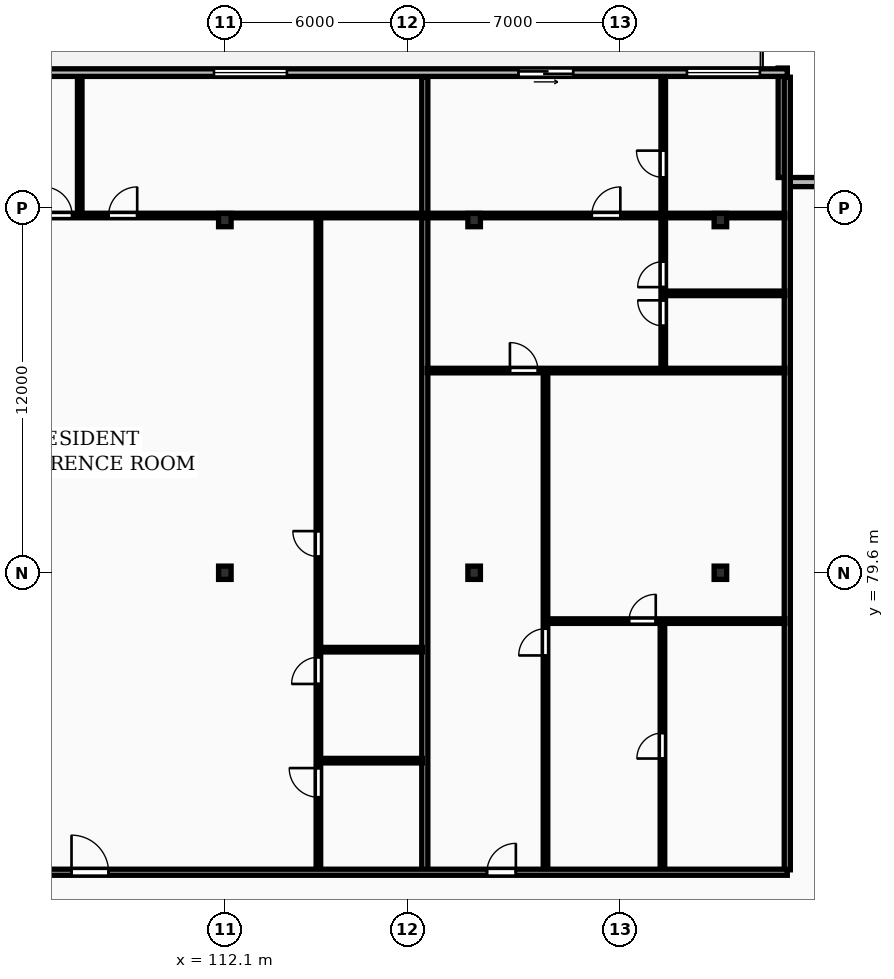
"""IFC4 building model, lengths in metres.
Left out: names, types, materials, properties, quantities, classifications, styles, units other than length and angle.
Written with IfcOpenShell. Run it as: python <this file> out.ifc"""

import sys

from ifc_helpers import new_model, si_unit, direction, frame, frame_2d, origin, origin_2d, place, context, subcontext, project, spatial, rectangle, i_section, extrude, element, fill, save


model = new_model("IFC4")
c1 = context("Model", 3, precision=1e-05, world=origin(), true_north=direction((0.0, 1.0)))
c2 = subcontext(c1, "Body", "Model", "MODEL_VIEW")
j1 = project(units=[si_unit("LENGTHUNIT", "METRE"), si_unit("PLANEANGLEUNIT", "RADIAN")], contexts=[c1])
p1 = place(None, origin())
s1 = spatial("IfcSite", under=j1, at=p1, CompositionType="ELEMENT")
p2 = place(p1, origin())
s2 = spatial("IfcBuilding", under=s1, at=p2, CompositionType="ELEMENT")
p3 = place(p2, frame((0.0, 0.0, 150.1)))
s3 = spatial("IfcBuildingStorey", under=s2, at=p3, CompositionType="ELEMENT", Elevation=150.1)
for number, where, z_axis, x_axis in (
    (1, (112.1, 79.6, 0.0), (0.0, 0.0, 1.0), (1.0, 0.0, 0.0)),
    (2, (112.1, 91.2, 0.0), (0.0, 0.0, 1.0), (1.0, 0.0, 0.0)),
    (3, (120.3, 79.6, 0.0), (0.0, 0.0, 1.0), (1.0, 0.0, 0.0)),
    (4, (120.3, 91.2, 0.0), (0.0, 0.0, 1.0), (1.0, 0.0, 0.0)),
    (5, (128.4, 79.6, 0.0), (0.0, 0.0, 1.0), (1.0, 0.0, 0.0)),
    (6, (128.4, 91.2, 0.0), (0.0, 0.0, 1.0), (1.0, 0.0, 0.0)),
):
    element("IfcColumn", number, at=place(p3, frame(where, z_axis=z_axis, x_axis=x_axis)), inside=s3, PredefinedType="COLUMN", context=c2, shape_type="SweptSolid", body=[
        extrude(i_section(OverallWidth=0.412, OverallDepth=0.437, WebThickness=0.036, FlangeThickness=0.052, FilletRadius=0.015, at=origin_2d()), origin(), (0.0, 0.0, 1.0), 3.6),
    ])
for number, where, z_axis, x_axis in (
    (7, (134.2, 92.45, 0.0), (0.0, 0.0, 1.0), (-1.0, 0.0, 0.0)),
    (8, (130.45, 92.6, 0.0), (0.0, 0.0, 1.0), (0.0, 1.0, 0.0)),
):
    element("IfcWall", number, at=place(p3, frame(where, z_axis=z_axis, x_axis=x_axis)), inside=s3, PredefinedType="STANDARD", context=c2, shape_type="SweptSolid", body=[
        extrude(rectangle(XDim=3.6, YDim=0.3, at=frame_2d((1.8, 0.0))), origin(), (0.0, 0.0, 1.0), 3.31),
    ])
p4 = place(p3, frame((130.6, 96.05, 0.0), z_axis=(0.0, 0.0, 1.0), x_axis=(-1.0, 0.0, 0.0)))
e9 = element("IfcWall", 9, at=p4, inside=s3, PredefinedType="STANDARD", context=c2, shape_type="SweptSolid", body=[
    extrude(rectangle(XDim=73.0, YDim=0.25, at=frame_2d((36.5, 0.0))), origin(), (0.0, 0.0, 1.0), 3.31),
])
p5 = place(p4, frame((67.311, 0.0, 0.0)))
e10 = element("IfcOpeningElement", 10, at=p5, cuts=e9, PredefinedType="OPENING", context=c2, shape_type="SweptSolid", body=[
    extrude(rectangle(XDim=1.8, YDim=2.2, at=frame_2d((0.9, 1.1))), frame((0.0, 0.135, 0.0), z_axis=(0.0, -1.0, 0.0), x_axis=(1.0, 0.0, 0.0)), (0.0, 0.0, 1.0), 0.27),
])
p6 = place(p4, frame((56.252, 0.0, 0.85)))
e11 = element("IfcOpeningElement", 11, at=p6, cuts=e9, PredefinedType="OPENING", context=c2, shape_type="SweptSolid", body=[
    extrude(rectangle(XDim=2.4, YDim=1.9, at=frame_2d((1.2, 0.95))), frame((0.0, 0.135, 0.0), z_axis=(0.0, -1.0, 0.0), x_axis=(1.0, 0.0, 0.0)), (0.0, 0.0, 1.0), 0.27),
])
p7 = place(p4, frame((46.071, 0.0, 0.0)))
e12 = element("IfcOpeningElement", 12, at=p7, cuts=e9, PredefinedType="OPENING", context=c2, shape_type="SweptSolid", body=[
    extrude(rectangle(XDim=1.8, YDim=2.2, at=frame_2d((0.9, 1.1))), frame((0.0, 0.135, 0.0), z_axis=(0.0, -1.0, 0.0), x_axis=(1.0, 0.0, 0.0)), (0.0, 0.0, 1.0), 0.27),
])
p8 = place(p4, frame((36.161, 0.0, 0.85)))
e13 = element("IfcOpeningElement", 13, at=p8, cuts=e9, PredefinedType="OPENING", context=c2, shape_type="SweptSolid", body=[
    extrude(rectangle(XDim=2.4, YDim=1.9, at=frame_2d((1.2, 0.95))), frame((0.0, 0.135, 0.0), z_axis=(0.0, -1.0, 0.0), x_axis=(1.0, 0.0, 0.0)), (0.0, 0.0, 1.0), 0.27),
])
p9 = place(p4, frame((26.569, 0.0, 0.0)))
e14 = element("IfcOpeningElement", 14, at=p9, cuts=e9, PredefinedType="OPENING", context=c2, shape_type="SweptSolid", body=[
    extrude(rectangle(XDim=1.8, YDim=2.2, at=frame_2d((0.9, 1.1))), frame((0.0, 0.135, 0.0), z_axis=(0.0, -1.0, 0.0), x_axis=(1.0, 0.0, 0.0)), (0.0, 0.0, 1.0), 0.27),
])
p10 = place(p4, frame((16.458, 0.0, 0.85)))
e15 = element("IfcOpeningElement", 15, at=p10, cuts=e9, PredefinedType="OPENING", context=c2, shape_type="SweptSolid", body=[
    extrude(rectangle(XDim=2.4, YDim=1.9, at=frame_2d((1.2, 0.95))), frame((0.0, 0.135, 0.0), z_axis=(0.0, -1.0, 0.0), x_axis=(1.0, 0.0, 0.0)), (0.0, 0.0, 1.0), 0.27),
])
p11 = place(p4, frame((7.042, 0.0, 0.0)))
e16 = element("IfcOpeningElement", 16, at=p11, cuts=e9, PredefinedType="OPENING", context=c2, shape_type="SweptSolid", body=[
    extrude(rectangle(XDim=1.8, YDim=2.2, at=frame_2d((0.9, 1.1))), frame((0.0, 0.135, 0.0), z_axis=(0.0, -1.0, 0.0), x_axis=(1.0, 0.0, 0.0)), (0.0, 0.0, 1.0), 0.27),
])
p12 = place(p4, frame((0.9, 0.0, 0.85)))
e17 = element("IfcOpeningElement", 17, at=p12, cuts=e9, PredefinedType="OPENING", context=c2, shape_type="SweptSolid", body=[
    extrude(rectangle(XDim=2.4, YDim=1.9, at=frame_2d((1.2, 0.95))), frame((0.0, 0.135, 0.0), z_axis=(0.0, -1.0, 0.0), x_axis=(1.0, 0.0, 0.0)), (0.0, 0.0, 1.0), 0.27),
])
for number, where, z_axis, x_axis in (
    (18, (130.6, 69.83, 0.0), (0.0, 0.0, 1.0), (0.0, 1.0, 0.0)),
    (19, (118.677, 69.83, 0.0), (0.0, 0.0, 1.0), (0.0, 1.0, 0.0)),
):
    element("IfcWall", number, at=place(p3, frame(where, z_axis=z_axis, x_axis=x_axis)), inside=s3, PredefinedType="PARTITIONING", context=c2, shape_type="SweptSolid", body=[
        extrude(rectangle(XDim=26.07, YDim=0.2, at=frame_2d((13.035, 0.0))), origin(), (0.0, 0.0, 1.0), 3.31),
    ])
for number, where, z_axis, x_axis in (
    (20, (115.237, 73.42, 0.0), (0.0, 0.0, 1.0), (1.0, 0.0, 0.0)),
    (21, (115.237, 77.07, 0.0), (0.0, 0.0, 1.0), (1.0, 0.0, 0.0)),
):
    element("IfcWall", number, at=place(p3, frame(where, z_axis=z_axis, x_axis=x_axis)), inside=s3, PredefinedType="PARTITIONING", context=c2, shape_type="SweptSolid", body=[
        extrude(rectangle(XDim=3.36, YDim=0.15, at=frame_2d((1.68, 0.0))), origin(), (0.0, 0.0, 1.0), 3.31),
    ])
p13 = place(p3, frame((115.177, 69.81, 0.0), z_axis=(0.0, 0.0, 1.0), x_axis=(0.0, 1.0, 0.0)))
e22 = element("IfcWall", 22, at=p13, inside=s3, PredefinedType="PARTITIONING", context=c2, shape_type="SweptSolid", body=[
    extrude(rectangle(XDim=21.48, YDim=0.15, at=frame_2d((10.74, 0.0))), origin(), (0.0, 0.0, 1.0), 3.31),
])
p14 = place(p13, frame((2.406, 0.0, 0.0)))
e23 = element("IfcOpeningElement", 23, at=p14, cuts=e22, PredefinedType="OPENING", context=c2, shape_type="SweptSolid", body=[
    extrude(rectangle(XDim=0.96, YDim=2.1, at=frame_2d((0.48, 1.05))), frame((0.0, 0.085, 0.0), z_axis=(0.0, -1.0, 0.0), x_axis=(1.0, 0.0, 0.0)), (0.0, 0.0, 1.0), 0.17),
])
p15 = place(p13, frame((6.133, 0.0, 0.0)))
e24 = element("IfcOpeningElement", 24, at=p15, cuts=e22, PredefinedType="OPENING", context=c2, shape_type="SweptSolid", body=[
    extrude(rectangle(XDim=0.88, YDim=2.06, at=frame_2d((0.44, 1.03))), frame((0.0, 0.085, 0.0), z_axis=(0.0, -1.0, 0.0), x_axis=(1.0, 0.0, 0.0)), (0.0, 0.0, 1.0), 0.17),
])
p16 = place(p13, frame((10.32, 0.0, 0.0)))
e25 = element("IfcOpeningElement", 25, at=p16, cuts=e22, PredefinedType="OPENING", context=c2, shape_type="SweptSolid", body=[
    extrude(rectangle(XDim=0.84, YDim=2.04, at=frame_2d((0.42, 1.02))), frame((0.0, 0.085, 0.0), z_axis=(0.0, -1.0, 0.0), x_axis=(1.0, 0.0, 0.0)), (0.0, 0.0, 1.0), 0.17),
])
p17 = place(p3, frame((107.327, 91.43, 0.0), z_axis=(0.0, 0.0, 1.0), x_axis=(0.0, 1.0, 0.0)))
e26 = element("IfcWall", 26, at=p17, inside=s3, PredefinedType="PARTITIONING", context=c2, shape_type="SweptSolid", body=[
    extrude(rectangle(XDim=4.47, YDim=0.15, at=frame_2d((2.235, 0.0))), origin(), (0.0, 0.0, 1.0), 3.31),
])
p18 = place(p3, frame((98.896, 91.35, 0.0), z_axis=(0.0, 0.0, 1.0), x_axis=(1.0, 0.0, 0.0)))
e27 = element("IfcWall", 27, at=p18, inside=s3, PredefinedType="PARTITIONING", context=c2, shape_type="SweptSolid", body=[
    extrude(rectangle(XDim=19.701, YDim=0.15, at=frame_2d((9.851, 0.0))), origin(), (0.0, 0.0, 1.0), 3.003),
])
p19 = place(p18, frame((7.24, 0.0, 0.0)))
e28 = element("IfcOpeningElement", 28, at=p19, cuts=e27, PredefinedType="OPENING", context=c2, shape_type="SweptSolid", body=[
    extrude(rectangle(XDim=0.94, YDim=2.1, at=frame_2d((0.47, 1.05))), frame((0.0, 0.085, 0.0), z_axis=(0.0, -1.0, 0.0), x_axis=(1.0, 0.0, 0.0)), (0.0, 0.0, 1.0), 0.17),
])
p20 = place(p18, frame((9.381, 0.0, 0.0)))
e29 = element("IfcOpeningElement", 29, at=p20, cuts=e27, PredefinedType="OPENING", context=c2, shape_type="SweptSolid", body=[
    extrude(rectangle(XDim=0.94, YDim=2.1, at=frame_2d((0.47, 1.05))), frame((0.0, 0.085, 0.0), z_axis=(0.0, -1.0, 0.0), x_axis=(1.0, 0.0, 0.0)), (0.0, 0.0, 1.0), 0.17),
])
p21 = place(p3, frame((126.494, 69.81, 0.0), z_axis=(0.0, 0.0, 1.0), x_axis=(0.0, 1.0, 0.0)))
e30 = element("IfcWall", 30, at=p21, inside=s3, PredefinedType="PARTITIONING", context=c2, shape_type="SweptSolid", body=[
    extrude(rectangle(XDim=8.2, YDim=0.15, at=frame_2d((4.1, 0.0))), origin(), (0.0, 0.0, 1.0), 3.31),
])
p22 = place(p21, frame((3.68, 0.0, 0.0)))
e31 = element("IfcOpeningElement", 31, at=p22, cuts=e30, PredefinedType="OPENING", context=c2, shape_type="SweptSolid", body=[
    extrude(rectangle(XDim=0.84, YDim=2.04, at=frame_2d((0.42, 1.02))), frame((0.0, 0.085, 0.0), z_axis=(0.0, -1.0, 0.0), x_axis=(1.0, 0.0, 0.0)), (0.0, 0.0, 1.0), 0.17),
])
p23 = place(p3, frame((122.707, 78.01, 0.0), z_axis=(0.0, 0.0, 1.0), x_axis=(1.0, 0.0, 0.0)))
e32 = element("IfcWall", 32, at=p23, inside=s3, PredefinedType="PARTITIONING", context=c2, shape_type="SweptSolid", body=[
    extrude(rectangle(XDim=7.813, YDim=0.15, at=frame_2d((3.906, 0.0))), origin(), (0.0, 0.0, 1.0), 3.31),
])
p24 = place(p23, frame((2.686, 0.0, 0.0)))
e33 = element("IfcOpeningElement", 33, at=p24, cuts=e32, PredefinedType="OPENING", context=c2, shape_type="SweptSolid", body=[
    extrude(rectangle(XDim=0.88, YDim=2.06, at=frame_2d((0.44, 1.03))), frame((0.0, 0.085, 0.0), z_axis=(0.0, -1.0, 0.0), x_axis=(1.0, 0.0, 0.0)), (0.0, 0.0, 1.0), 0.17),
])
p25 = place(p3, frame((122.647, 69.81, 0.0), z_axis=(0.0, 0.0, 1.0), x_axis=(0.0, 1.0, 0.0)))
e34 = element("IfcWall", 34, at=p25, inside=s3, PredefinedType="PARTITIONING", context=c2, shape_type="SweptSolid", body=[
    extrude(rectangle(XDim=16.4, YDim=0.15, at=frame_2d((8.2, 0.0))), origin(), (0.0, 0.0, 1.0), 3.31),
])
p26 = place(p25, frame((7.07, 0.0, 0.0)))
e35 = element("IfcOpeningElement", 35, at=p26, cuts=e34, PredefinedType="OPENING", context=c2, shape_type="SweptSolid", body=[
    extrude(rectangle(XDim=0.88, YDim=2.06, at=frame_2d((0.44, 1.03))), frame((0.0, 0.085, 0.0), z_axis=(0.0, -1.0, 0.0), x_axis=(1.0, 0.0, 0.0)), (0.0, 0.0, 1.0), 0.17),
])
p27 = place(p3, frame((126.58, 88.79, 0.0), z_axis=(0.0, 0.0, 1.0), x_axis=(1.0, 0.0, 0.0)))
e36 = element("IfcWall", 36, at=p27, inside=s3, PredefinedType="PARTITIONING", context=c2, shape_type="SweptSolid", body=[
    extrude(rectangle(XDim=3.94, YDim=0.15, at=frame_2d((1.97, 0.0))), origin(), (0.0, 0.0, 1.0), 3.31),
])
p28 = place(p3, frame((126.52, 86.29, 0.0), z_axis=(0.0, 0.0, 1.0), x_axis=(0.0, 1.0, 0.0)))
e37 = element("IfcWall", 37, at=p28, inside=s3, PredefinedType="PARTITIONING", context=c2, shape_type="SweptSolid", body=[
    extrude(rectangle(XDim=9.61, YDim=0.15, at=frame_2d((4.805, 0.0))), origin(), (0.0, 0.0, 1.0), 3.31),
])
p29 = place(p28, frame((1.43, 0.0, 0.0)))
e38 = element("IfcOpeningElement", 38, at=p29, cuts=e37, PredefinedType="OPENING", context=c2, shape_type="SweptSolid", body=[
    extrude(rectangle(XDim=0.84, YDim=2.04, at=frame_2d((0.42, 1.02))), frame((0.0, 0.085, 0.0), z_axis=(0.0, -1.0, 0.0), x_axis=(1.0, 0.0, 0.0)), (0.0, 0.0, 1.0), 0.17),
])
p30 = place(p28, frame((2.705, 0.0, 0.0)))
e39 = element("IfcOpeningElement", 39, at=p30, cuts=e37, PredefinedType="OPENING", context=c2, shape_type="SweptSolid", body=[
    extrude(rectangle(XDim=0.84, YDim=2.04, at=frame_2d((0.42, 1.02))), frame((0.0, 0.085, 0.0), z_axis=(0.0, -1.0, 0.0), x_axis=(1.0, 0.0, 0.0)), (0.0, 0.0, 1.0), 0.17),
])
p31 = place(p28, frame((6.314, 0.0, 0.0)))
e40 = element("IfcOpeningElement", 40, at=p31, cuts=e37, PredefinedType="OPENING", context=c2, shape_type="SweptSolid", body=[
    extrude(rectangle(XDim=0.88, YDim=2.06, at=frame_2d((0.44, 1.03))), frame((0.0, 0.085, 0.0), z_axis=(0.0, -1.0, 0.0), x_axis=(1.0, 0.0, 0.0)), (0.0, 0.0, 1.0), 0.17),
])
p32 = place(p3, frame((118.757, 86.25, 0.0), z_axis=(0.0, 0.0, 1.0), x_axis=(1.0, 0.0, 0.0)))
e41 = element("IfcWall", 41, at=p32, inside=s3, PredefinedType="PARTITIONING", context=c2, shape_type="SweptSolid", body=[
    extrude(rectangle(XDim=11.763, YDim=0.15, at=frame_2d((5.881, 0.0))), origin(), (0.0, 0.0, 1.0), 3.31),
])
p33 = place(p32, frame((2.72, 0.0, 0.0)))
e42 = element("IfcOpeningElement", 42, at=p33, cuts=e41, PredefinedType="OPENING", context=c2, shape_type="SweptSolid", body=[
    extrude(rectangle(XDim=0.92, YDim=2.08, at=frame_2d((0.46, 1.04))), frame((0.0, 0.085, 0.0), z_axis=(0.0, -1.0, 0.0), x_axis=(1.0, 0.0, 0.0)), (0.0, 0.0, 1.0), 0.17),
])
p34 = place(p3, frame((118.757, 91.35, 0.0), z_axis=(0.0, 0.0, 1.0), x_axis=(1.0, 0.0, 0.0)))
e43 = element("IfcWall", 43, at=p34, inside=s3, PredefinedType="PARTITIONING", context=c2, shape_type="SweptSolid", body=[
    extrude(rectangle(XDim=11.763, YDim=0.15, at=frame_2d((5.881, 0.0))), origin(), (0.0, 0.0, 1.0), 3.003),
])
p35 = place(p34, frame((5.411, 0.0, 0.0)))
e44 = element("IfcOpeningElement", 44, at=p35, cuts=e43, PredefinedType="OPENING", context=c2, shape_type="SweptSolid", body=[
    extrude(rectangle(XDim=0.94, YDim=2.1, at=frame_2d((0.47, 1.05))), frame((0.0, 0.085, 0.0), z_axis=(0.0, -1.0, 0.0), x_axis=(1.0, 0.0, 0.0)), (0.0, 0.0, 1.0), 0.17),
])
p36 = place(p3, frame((57.6, 69.75, 0.0), z_axis=(0.0, 0.0, 1.0), x_axis=(1.0, 0.0, 0.0)))
e45 = element("IfcWall", 45, at=p36, inside=s3, PredefinedType="PARTITIONING", context=c2, shape_type="SweptSolid", body=[
    extrude(rectangle(XDim=73.0, YDim=0.2, at=frame_2d((36.5, 0.0))), origin(), (0.0, 0.0, 1.0), 3.31),
])
p37 = place(p36, frame((9.189, 0.0, 0.0)))
e46 = element("IfcOpeningElement", 46, at=p37, cuts=e45, PredefinedType="OPENING", context=c2, shape_type="SweptSolid", body=[
    extrude(rectangle(XDim=1.22, YDim=2.18, at=frame_2d((0.61, 1.09))), frame((0.0, 0.11, 0.0), z_axis=(0.0, -1.0, 0.0), x_axis=(1.0, 0.0, 0.0)), (0.0, 0.0, 1.0), 0.22),
])
p38 = place(p36, frame((29.912, 0.0, 0.0)))
e47 = element("IfcOpeningElement", 47, at=p38, cuts=e45, PredefinedType="OPENING", context=c2, shape_type="SweptSolid", body=[
    extrude(rectangle(XDim=1.22, YDim=2.18, at=frame_2d((0.61, 1.09))), frame((0.0, 0.11, 0.0), z_axis=(0.0, -1.0, 0.0), x_axis=(1.0, 0.0, 0.0)), (0.0, 0.0, 1.0), 0.22),
])
p39 = place(p36, frame((49.457, 0.0, 0.0)))
e48 = element("IfcOpeningElement", 48, at=p39, cuts=e45, PredefinedType="OPENING", context=c2, shape_type="SweptSolid", body=[
    extrude(rectangle(XDim=1.22, YDim=2.18, at=frame_2d((0.61, 1.09))), frame((0.0, 0.11, 0.0), z_axis=(0.0, -1.0, 0.0), x_axis=(1.0, 0.0, 0.0)), (0.0, 0.0, 1.0), 0.22),
])
p40 = place(p36, frame((63.122, 0.0, 0.0)))
e49 = element("IfcOpeningElement", 49, at=p40, cuts=e45, PredefinedType="OPENING", context=c2, shape_type="SweptSolid", body=[
    extrude(rectangle(XDim=0.95, YDim=2.15, at=frame_2d((0.475, 1.075))), frame((0.0, 0.11, 0.0), z_axis=(0.0, -1.0, 0.0), x_axis=(1.0, 0.0, 0.0)), (0.0, 0.0, 1.0), 0.22),
])
p41 = place(p10, origin())
e50 = element("IfcWindow", 50, at=p41, inside=s3, PartitioningType="DOUBLE_PANEL_VERTICAL", PredefinedType="WINDOW", context=c2, shape_type="SweptSolid", body=[
    extrude(rectangle(XDim=2.4, YDim=1.9, at=frame_2d((1.2, 0.95))), frame((0.0, 0.03, 0.0), z_axis=(0.0, -1.0, 0.0), x_axis=(1.0, 0.0, 0.0)), (0.0, 0.0, 1.0), 0.06),
])
fill(e15, e50)
p42 = place(p11, origin())
e51 = element("IfcDoor", 51, at=p42, inside=s3, OperationType="SLIDING_TO_LEFT", PredefinedType="DOOR", context=c2, shape_type="SweptSolid", body=[
    extrude(rectangle(XDim=1.8, YDim=2.2, at=frame_2d((0.9, 1.1))), frame((0.0, 0.025, 0.0), z_axis=(0.0, -1.0, 0.0), x_axis=(1.0, 0.0, 0.0)), (0.0, 0.0, 1.0), 0.05),
])
fill(e16, e51)
p43 = place(p12, origin())
e52 = element("IfcWindow", 52, at=p43, inside=s3, PartitioningType="DOUBLE_PANEL_VERTICAL", PredefinedType="WINDOW", context=c2, shape_type="SweptSolid", body=[
    extrude(rectangle(XDim=2.4, YDim=1.9, at=frame_2d((1.2, 0.95))), frame((0.0, 0.03, 0.0), z_axis=(0.0, -1.0, 0.0), x_axis=(1.0, 0.0, 0.0)), (0.0, 0.0, 1.0), 0.06),
])
fill(e17, e52)
p44 = place(p14, origin())
e53 = element("IfcDoor", 53, at=p44, inside=s3, OperationType="SINGLE_SWING_RIGHT", PredefinedType="DOOR", context=c2, shape_type="SweptSolid", body=[
    extrude(rectangle(XDim=0.96, YDim=2.1, at=frame_2d((0.48, 1.05))), frame((0.0, 0.025, 0.0), z_axis=(0.0, -1.0, 0.0), x_axis=(1.0, 0.0, 0.0)), (0.0, 0.0, 1.0), 0.05),
])
fill(e23, e53)
p45 = place(p15, origin())
e54 = element("IfcDoor", 54, at=p45, inside=s3, OperationType="SINGLE_SWING_LEFT", PredefinedType="DOOR", context=c2, shape_type="SweptSolid", body=[
    extrude(rectangle(XDim=0.88, YDim=2.06, at=frame_2d((0.44, 1.03))), frame((0.0, 0.025, 0.0), z_axis=(0.0, -1.0, 0.0), x_axis=(1.0, 0.0, 0.0)), (0.0, 0.0, 1.0), 0.05),
])
fill(e24, e54)
p46 = place(p16, origin())
e55 = element("IfcDoor", 55, at=p46, inside=s3, OperationType="SINGLE_SWING_RIGHT", PredefinedType="DOOR", context=c2, shape_type="SweptSolid", body=[
    extrude(rectangle(XDim=0.84, YDim=2.04, at=frame_2d((0.42, 1.02))), frame((0.0, 0.025, 0.0), z_axis=(0.0, -1.0, 0.0), x_axis=(1.0, 0.0, 0.0)), (0.0, 0.0, 1.0), 0.05),
])
fill(e25, e55)
p47 = place(p19, origin())
e56 = element("IfcDoor", 56, at=p47, inside=s3, OperationType="SINGLE_SWING_LEFT", PredefinedType="DOOR", context=c2, shape_type="SweptSolid", body=[
    extrude(rectangle(XDim=0.94, YDim=2.1, at=frame_2d((0.47, 1.05))), frame((0.0, 0.025, 0.0), z_axis=(0.0, -1.0, 0.0), x_axis=(1.0, 0.0, 0.0)), (0.0, 0.0, 1.0), 0.05),
])
fill(e28, e56)
p48 = place(p20, origin())
e57 = element("IfcDoor", 57, at=p48, inside=s3, OperationType="SINGLE_SWING_RIGHT", PredefinedType="DOOR", context=c2, shape_type="SweptSolid", body=[
    extrude(rectangle(XDim=0.94, YDim=2.1, at=frame_2d((0.47, 1.05))), frame((0.0, 0.025, 0.0), z_axis=(0.0, -1.0, 0.0), x_axis=(1.0, 0.0, 0.0)), (0.0, 0.0, 1.0), 0.05),
])
fill(e29, e57)
p49 = place(p22, origin())
e58 = element("IfcDoor", 58, at=p49, inside=s3, OperationType="SINGLE_SWING_LEFT", PredefinedType="DOOR", context=c2, shape_type="SweptSolid", body=[
    extrude(rectangle(XDim=0.84, YDim=2.04, at=frame_2d((0.42, 1.02))), frame((0.0, 0.025, 0.0), z_axis=(0.0, -1.0, 0.0), x_axis=(1.0, 0.0, 0.0)), (0.0, 0.0, 1.0), 0.05),
])
fill(e31, e58)
p50 = place(p24, origin())
e59 = element("IfcDoor", 59, at=p50, inside=s3, OperationType="SINGLE_SWING_RIGHT", PredefinedType="DOOR", context=c2, shape_type="SweptSolid", body=[
    extrude(rectangle(XDim=0.88, YDim=2.06, at=frame_2d((0.44, 1.03))), frame((0.0, 0.025, 0.0), z_axis=(0.0, -1.0, 0.0), x_axis=(1.0, 0.0, 0.0)), (0.0, 0.0, 1.0), 0.05),
])
fill(e33, e59)
p51 = place(p26, origin())
e60 = element("IfcDoor", 60, at=p51, inside=s3, OperationType="SINGLE_SWING_LEFT", PredefinedType="DOOR", context=c2, shape_type="SweptSolid", body=[
    extrude(rectangle(XDim=0.88, YDim=2.06, at=frame_2d((0.44, 1.03))), frame((0.0, 0.025, 0.0), z_axis=(0.0, -1.0, 0.0), x_axis=(1.0, 0.0, 0.0)), (0.0, 0.0, 1.0), 0.05),
])
fill(e35, e60)
p52 = place(p29, origin())
e61 = element("IfcDoor", 61, at=p52, inside=s3, OperationType="SINGLE_SWING_RIGHT", PredefinedType="DOOR", context=c2, shape_type="SweptSolid", body=[
    extrude(rectangle(XDim=0.84, YDim=2.04, at=frame_2d((0.42, 1.02))), frame((0.0, 0.025, 0.0), z_axis=(0.0, -1.0, 0.0), x_axis=(1.0, 0.0, 0.0)), (0.0, 0.0, 1.0), 0.05),
])
fill(e38, e61)
p53 = place(p30, origin())
e62 = element("IfcDoor", 62, at=p53, inside=s3, OperationType="SINGLE_SWING_LEFT", PredefinedType="DOOR", context=c2, shape_type="SweptSolid", body=[
    extrude(rectangle(XDim=0.84, YDim=2.04, at=frame_2d((0.42, 1.02))), frame((0.0, 0.025, 0.0), z_axis=(0.0, -1.0, 0.0), x_axis=(1.0, 0.0, 0.0)), (0.0, 0.0, 1.0), 0.05),
])
fill(e39, e62)
p54 = place(p31, origin())
e63 = element("IfcDoor", 63, at=p54, inside=s3, OperationType="SINGLE_SWING_RIGHT", PredefinedType="DOOR", context=c2, shape_type="SweptSolid", body=[
    extrude(rectangle(XDim=0.88, YDim=2.06, at=frame_2d((0.44, 1.03))), frame((0.0, 0.025, 0.0), z_axis=(0.0, -1.0, 0.0), x_axis=(1.0, 0.0, 0.0)), (0.0, 0.0, 1.0), 0.05),
])
fill(e40, e63)
p55 = place(p33, origin())
e64 = element("IfcDoor", 64, at=p55, inside=s3, OperationType="SINGLE_SWING_LEFT", PredefinedType="DOOR", context=c2, shape_type="SweptSolid", body=[
    extrude(rectangle(XDim=0.92, YDim=2.08, at=frame_2d((0.46, 1.04))), frame((0.0, 0.025, 0.0), z_axis=(0.0, -1.0, 0.0), x_axis=(1.0, 0.0, 0.0)), (0.0, 0.0, 1.0), 0.05),
])
fill(e42, e64)
p56 = place(p35, origin())
e65 = element("IfcDoor", 65, at=p56, inside=s3, OperationType="SINGLE_SWING_RIGHT", PredefinedType="DOOR", context=c2, shape_type="SweptSolid", body=[
    extrude(rectangle(XDim=0.94, YDim=2.1, at=frame_2d((0.47, 1.05))), frame((0.0, 0.025, 0.0), z_axis=(0.0, -1.0, 0.0), x_axis=(1.0, 0.0, 0.0)), (0.0, 0.0, 1.0), 0.05),
])
fill(e44, e65)
p57 = place(p39, origin())
e66 = element("IfcDoor", 66, at=p57, inside=s3, OperationType="SINGLE_SWING_LEFT", PredefinedType="DOOR", context=c2, shape_type="SweptSolid", body=[
    extrude(rectangle(XDim=1.22, YDim=2.18, at=frame_2d((0.61, 1.09))), frame((0.0, 0.025, 0.0), z_axis=(0.0, -1.0, 0.0), x_axis=(1.0, 0.0, 0.0)), (0.0, 0.0, 1.0), 0.05),
])
fill(e48, e66)
p58 = place(p40, origin())
e67 = element("IfcDoor", 67, at=p58, inside=s3, OperationType="SINGLE_SWING_RIGHT", PredefinedType="DOOR", context=c2, shape_type="SweptSolid", body=[
    extrude(rectangle(XDim=0.95, YDim=2.15, at=frame_2d((0.475, 1.075))), frame((0.0, 0.025, 0.0), z_axis=(0.0, -1.0, 0.0), x_axis=(1.0, 0.0, 0.0)), (0.0, 0.0, 1.0), 0.05),
])
fill(e49, e67)
save(model, sys.argv[1])
